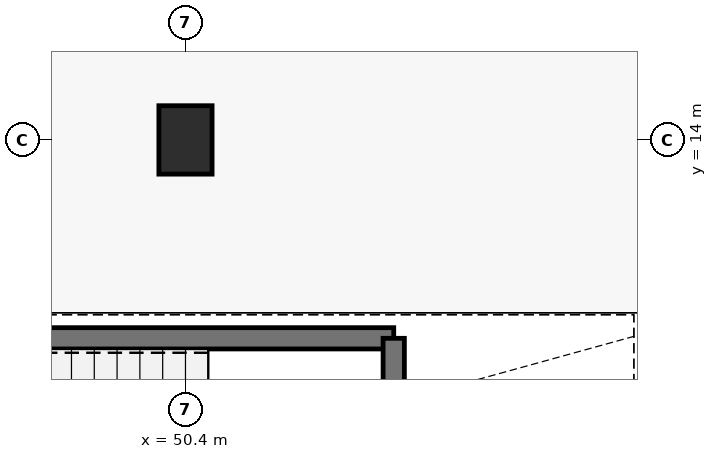
"""IFC4 building model, lengths in metres.
Left out: names, types, materials, properties, quantities, classifications, styles, units other than length and angle.
Written with IfcOpenShell. Run it as: python <this file> out.ifc"""

import sys

from ifc_helpers import new_model, si_unit, direction, frame, frame_2d, origin, origin_2d, place, context, subcontext, project, spatial, rectangle, extrude, element, save


model = new_model("IFC4")
c1 = context("Model", 3, precision=1e-05, world=origin(), true_north=direction((0.0, 1.0)))
c2 = subcontext(c1, "Body", "Model", "MODEL_VIEW")
j1 = project(units=[si_unit("LENGTHUNIT", "METRE"), si_unit("PLANEANGLEUNIT", "RADIAN")], contexts=[c1])
p1 = place(None, origin())
s1 = spatial("IfcSite", under=j1, at=p1, CompositionType="ELEMENT")
p2 = place(p1, origin())
s2 = spatial("IfcBuilding", under=s1, at=p2, CompositionType="ELEMENT")
p3 = place(p2, origin())
s3 = spatial("IfcBuildingStorey", under=s2, at=p3, CompositionType="ELEMENT", Elevation=0.0)
p4 = place(p3, frame((50.4, 14.0, -0.46), z_axis=(0.0, 0.0, 1.0), x_axis=(1.0, 0.0, 0.0)))
e1 = element("IfcColumn", 1, at=p4, inside=s3, PredefinedType="COLUMN", context=c2, shape_type="SweptSolid", body=[
    extrude(rectangle(XDim=0.7, YDim=0.9, at=origin_2d()), origin(), (0.0, 0.0, 1.0), 5.9),
])
p5 = place(p3, frame((44.26, 11.39, 0.0), z_axis=(0.0, 0.0, 1.0), x_axis=(1.0, 0.0, 0.0)))
e2 = element("IfcWall", 2, at=p5, inside=s3, PredefinedType="SHEAR", context=c2, shape_type="SweptSolid", body=[
    extrude(rectangle(XDim=8.88, YDim=0.28, at=frame_2d((4.44, 0.0))), origin(), (0.0, 0.0, 1.0), 5.44),
])
p6 = place(p3, frame((53.14, 7.96, 0.0), z_axis=(0.0, 0.0, 1.0), x_axis=(0.0, 1.0, 0.0)))
e3 = element("IfcWall", 3, at=p6, inside=s3, PredefinedType="SHEAR", context=c2, shape_type="SweptSolid", body=[
    extrude(rectangle(XDim=3.43, YDim=0.28, at=frame_2d((1.715, 0.0))), origin(), (0.0, 0.0, 1.0), 5.44),
])
save(model, sys.argv[1])
